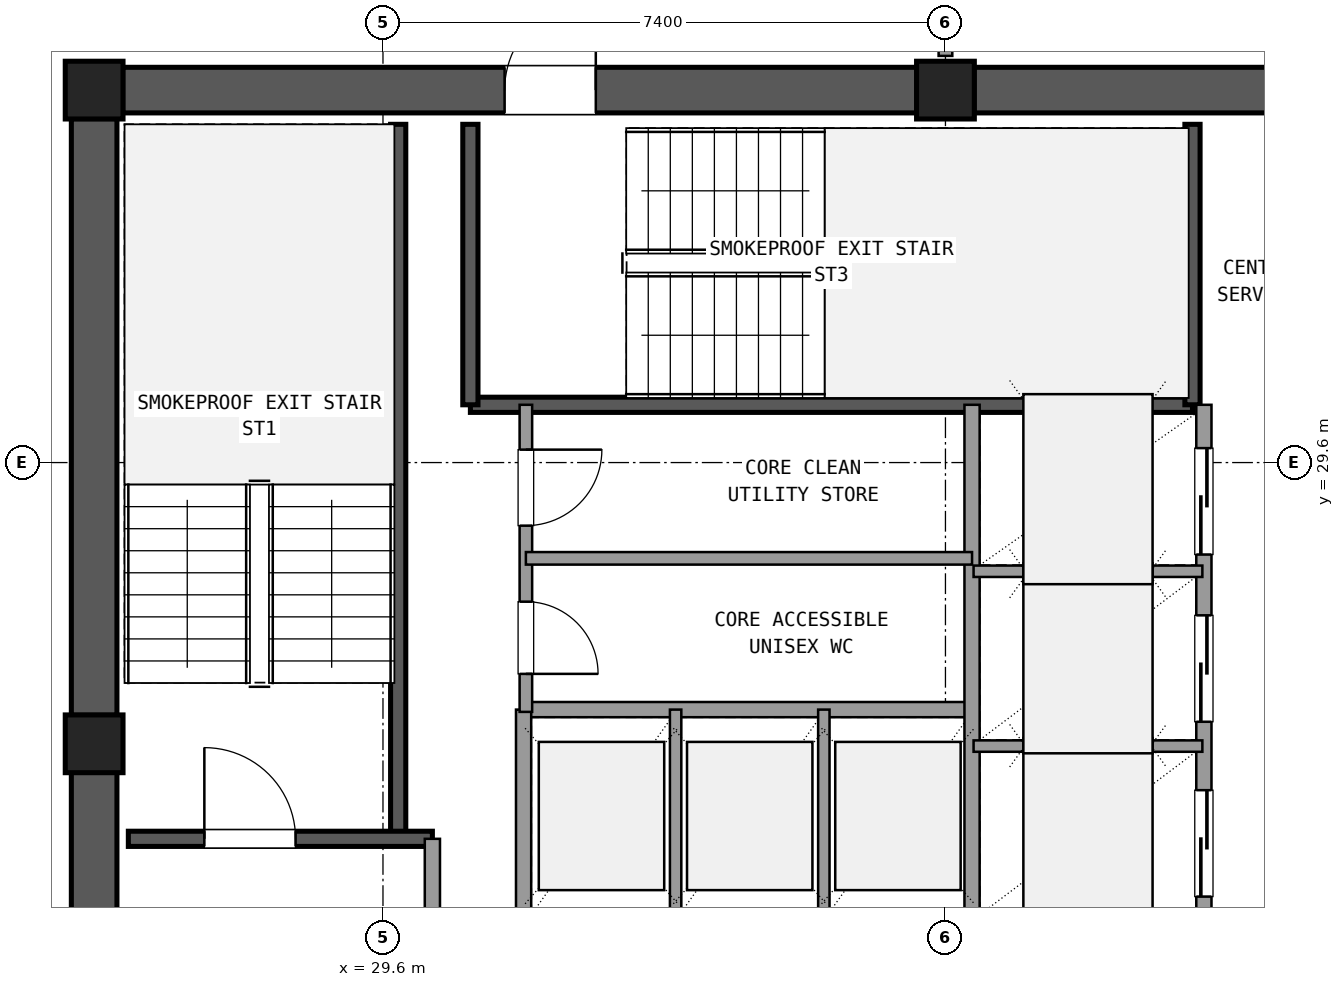
"""IFC4 building model, lengths in metres.
Left out: names, types, materials, properties, quantities, classifications, styles, units other than length and angle.
Written with IfcOpenShell. Run it as: python <this file> out.ifc"""

import sys

from ifc_helpers import new_model, si_unit, direction, frame, frame_2d, origin, origin_2d, place, context, subcontext, project, spatial, rectangle, extrude, element, fill, save


model = new_model("IFC4")
c1 = context("Model", 3, precision=1e-05, world=origin(), true_north=direction((0.0, 1.0)))
c2 = subcontext(c1, "Body", "Model", "MODEL_VIEW")
j1 = project(units=[si_unit("LENGTHUNIT", "METRE"), si_unit("PLANEANGLEUNIT", "RADIAN")], contexts=[c1])
p1 = place(None, origin())
s1 = spatial("IfcSite", under=j1, at=p1, CompositionType="ELEMENT")
p2 = place(p1, origin())
s2 = spatial("IfcBuilding", under=s1, at=p2, CompositionType="ELEMENT")
p3 = place(p2, frame((0.0, 0.0, 264.42)))
s3 = spatial("IfcBuildingStorey", under=s2, at=p3, CompositionType="ELEMENT", Elevation=264.42)
for number, where, z_axis, x_axis in (
    (1, (37.0, 34.5, 0.0), (0.0, 0.0, 1.0), (1.0, 0.0, 0.0)),
    (2, (25.8, 34.5, 0.0), (0.0, 0.0, 1.0), (1.0, 0.0, 0.0)),
    (3, (25.8, 25.9, 0.0), (0.0, 0.0, 1.0), (1.0, 0.0, 0.0)),
):
    element("IfcColumn", number, at=place(p3, frame(where, z_axis=z_axis, x_axis=x_axis)), inside=s3, PredefinedType="COLUMN", context=c2, shape_type="SweptSolid", body=[
        extrude(rectangle(XDim=0.76, YDim=0.76, at=origin_2d()), origin(), (0.0, 0.0, 1.0), 3.6),
    ])
p4 = place(p3, frame((47.825, 34.5, 0.0), z_axis=(0.0, 0.0, 1.0), x_axis=(-1.0, 0.0, 0.0)))
e4 = element("IfcWall", 4, at=p4, inside=s3, PredefinedType="SHEAR", context=c2, shape_type="SweptSolid", body=[
    extrude(rectangle(XDim=10.45, YDim=0.6, at=frame_2d((5.225, 0.0))), origin(), (0.0, 0.0, 1.0), 3.32),
])
p5 = place(p4, frame((4.725, 0.0, 0.0)))
e5 = element("IfcOpeningElement", 5, at=p5, cuts=e4, PredefinedType="OPENING", context=c2, shape_type="SweptSolid", body=[
    extrude(rectangle(XDim=1.6, YDim=2.2, at=frame_2d((0.8, 1.1))), frame((0.0, 0.31, 0.0), z_axis=(0.0, -1.0, 0.0), x_axis=(1.0, 0.0, 0.0)), (0.0, 0.0, 1.0), 0.62),
])
p6 = place(p3, frame((36.625, 34.5, 0.0), z_axis=(0.0, 0.0, 1.0), x_axis=(-1.0, 0.0, 0.0)))
e6 = element("IfcWall", 6, at=p6, inside=s3, PredefinedType="SHEAR", context=c2, shape_type="SweptSolid", body=[
    extrude(rectangle(XDim=10.45, YDim=0.6, at=frame_2d((5.225, 0.0))), origin(), (0.0, 0.0, 1.0), 3.32),
])
p7 = place(p6, frame((4.225, 0.0, 0.0)))
e7 = element("IfcOpeningElement", 7, at=p7, cuts=e6, PredefinedType="OPENING", context=c2, shape_type="SweptSolid", body=[
    extrude(rectangle(XDim=1.2, YDim=2.15, at=frame_2d((0.6, 1.075))), frame((0.0, 0.31, 0.0), z_axis=(0.0, -1.0, 0.0), x_axis=(1.0, 0.0, 0.0)), (0.0, 0.0, 1.0), 0.62),
])
p8 = place(p3, frame((25.8, 34.125, 0.0), z_axis=(0.0, 0.0, 1.0), x_axis=(0.0, -1.0, 0.0)))
e8 = element("IfcWall", 8, at=p8, inside=s3, PredefinedType="SHEAR", context=c2, shape_type="SweptSolid", body=[
    extrude(rectangle(XDim=7.85, YDim=0.6, at=frame_2d((3.925, 0.0))), origin(), (0.0, 0.0, 1.0), 3.32),
])
p9 = place(p3, frame((25.8, 25.525, 0.0), z_axis=(0.0, 0.0, 1.0), x_axis=(0.0, -1.0, 0.0)))
e9 = element("IfcWall", 9, at=p9, inside=s3, PredefinedType="SHEAR", context=c2, shape_type="SweptSolid", body=[
    extrude(rectangle(XDim=7.85, YDim=0.6, at=frame_2d((3.925, 0.0))), origin(), (0.0, 0.0, 1.0), 3.32),
])
p10 = place(p9, frame((2.275, 0.0, 0.0)))
e10 = element("IfcOpeningElement", 10, at=p10, cuts=e9, PredefinedType="OPENING", context=c2, shape_type="SweptSolid", body=[
    extrude(rectangle(XDim=1.2, YDim=2.15, at=frame_2d((0.6, 1.075))), frame((0.0, 0.31, 0.0), z_axis=(0.0, -1.0, 0.0), x_axis=(1.0, 0.0, 0.0)), (0.0, 0.0, 1.0), 0.62),
])
p11 = place(p3, frame((29.8, 24.65, 0.0), z_axis=(0.0, 0.0, 1.0), x_axis=(0.0, 1.0, 0.0)))
e11 = element("IfcWall", 11, at=p11, inside=s3, PredefinedType="SHEAR", context=c2, shape_type="SweptSolid", body=[
    extrude(rectangle(XDim=9.4, YDim=0.2, at=frame_2d((4.7, 0.0))), origin(), (0.0, 0.0, 1.0), 3.32),
])
p12 = place(p3, frame((26.25, 24.65, 0.0), z_axis=(0.0, 0.0, 1.0), x_axis=(1.0, 0.0, 0.0)))
e12 = element("IfcWall", 12, at=p12, inside=s3, PredefinedType="SHEAR", context=c2, shape_type="SweptSolid", body=[
    extrude(rectangle(XDim=4.0, YDim=0.2, at=frame_2d((2.0, 0.0))), origin(), (0.0, 0.0, 1.0), 3.32),
])
p13 = place(p12, frame((1.0, 0.0, 0.0)))
e13 = element("IfcOpeningElement", 13, at=p13, cuts=e12, PredefinedType="OPENING", context=c2, shape_type="SweptSolid", body=[
    extrude(rectangle(XDim=1.2, YDim=2.15, at=frame_2d((0.6, 1.075))), frame((0.0, 0.11, 0.0), z_axis=(0.0, -1.0, 0.0), x_axis=(1.0, 0.0, 0.0)), (0.0, 0.0, 1.0), 0.22),
])
p14 = place(p3, frame((30.75, 30.36, 0.0), z_axis=(0.0, 0.0, 1.0), x_axis=(1.0, 0.0, 0.0)))
e14 = element("IfcWall", 14, at=p14, inside=s3, PredefinedType="SHEAR", context=c2, shape_type="SweptSolid", body=[
    extrude(rectangle(XDim=9.5, YDim=0.2, at=frame_2d((4.75, 0.0))), origin(), (0.0, 0.0, 1.0), 3.32),
])
for number, where, z_axis, x_axis in (
    (15, (30.75, 30.36, 0.0), (0.0, 0.0, 1.0), (0.0, 1.0, 0.0)),
    (16, (40.25, 30.36, 0.0), (0.0, 0.0, 1.0), (0.0, 1.0, 0.0)),
):
    element("IfcWall", number, at=place(p3, frame(where, z_axis=z_axis, x_axis=x_axis)), inside=s3, PredefinedType="SHEAR", context=c2, shape_type="SweptSolid", body=[
        extrude(rectangle(XDim=3.69, YDim=0.2, at=frame_2d((1.845, 0.0))), origin(), (0.0, 0.0, 1.0), 3.32),
    ])
p15 = place(p3, frame((30.25, 17.75, 0.0), z_axis=(0.0, 0.0, 1.0), x_axis=(0.0, 1.0, 0.0)))
e17 = element("IfcWall", 17, at=p15, inside=s3, PredefinedType="SOLIDWALL", context=c2, shape_type="SweptSolid", body=[
    extrude(rectangle(XDim=6.9, YDim=0.2, at=frame_2d((3.45, 0.0))), origin(), (0.0, 0.0, 1.0), 2.61),
])
p16 = place(p15, frame((4.15, 0.0, 0.0)))
e18 = element("IfcOpeningElement", 18, at=p16, cuts=e17, PredefinedType="OPENING", context=c2, shape_type="SweptSolid", body=[
    extrude(rectangle(XDim=1.2, YDim=2.15, at=frame_2d((0.6, 1.075))), frame((0.0, 0.11, 0.0), z_axis=(0.0, -1.0, 0.0), x_axis=(1.0, 0.0, 0.0)), (0.0, 0.0, 1.0), 0.22),
])
p17 = place(p3, frame((31.45, 26.35, 0.0), z_axis=(0.0, 0.0, 1.0), x_axis=(1.0, 0.0, 0.0)))
e19 = element("IfcWall", 19, at=p17, inside=s3, PredefinedType="SOLIDWALL", context=c2, shape_type="SweptSolid", body=[
    extrude(rectangle(XDim=5.9, YDim=0.2, at=frame_2d((2.95, 0.0))), origin(), (0.0, 0.0, 1.0), 2.61),
])
p18 = place(p3, frame((31.45, 23.54, 0.0), z_axis=(0.0, 0.0, 1.0), x_axis=(0.0, 1.0, 0.0)))
e20 = element("IfcWall", 20, at=p18, inside=s3, PredefinedType="SOLIDWALL", context=c2, shape_type="SweptSolid", body=[
    extrude(rectangle(XDim=2.81, YDim=0.2, at=frame_2d((1.405, 0.0))), origin(), (0.0, 0.0, 1.0), 2.61),
])
for number, where, z_axis, x_axis in (
    (21, (33.45, 23.54, 0.0), (0.0, 0.0, 1.0), (0.0, 1.0, 0.0)),
    (22, (35.4, 23.54, 0.0), (0.0, 0.0, 1.0), (0.0, 1.0, 0.0)),
):
    element("IfcWall", number, at=place(p3, frame(where, z_axis=z_axis, x_axis=x_axis)), inside=s3, PredefinedType="PARTITIONING", context=c2, shape_type="SweptSolid", body=[
        extrude(rectangle(XDim=2.81, YDim=0.15, at=frame_2d((1.405, 0.0))), origin(), (0.0, 0.0, 1.0), 2.61),
    ])
p19 = place(p3, frame((37.35, 23.54, 0.0), z_axis=(0.0, 0.0, 1.0), x_axis=(0.0, 1.0, 0.0)))
e23 = element("IfcWall", 23, at=p19, inside=s3, PredefinedType="SOLIDWALL", context=c2, shape_type="SweptSolid", body=[
    extrude(rectangle(XDim=6.82, YDim=0.2, at=frame_2d((3.41, 0.0))), origin(), (0.0, 0.0, 1.0), 2.61),
])
p20 = place(p3, frame((40.4, 23.54, 0.0), z_axis=(0.0, 0.0, 1.0), x_axis=(0.0, 1.0, 0.0)))
e24 = element("IfcWall", 24, at=p20, inside=s3, PredefinedType="SOLIDWALL", context=c2, shape_type="SweptSolid", body=[
    extrude(rectangle(XDim=6.82, YDim=0.2, at=frame_2d((3.41, 0.0))), origin(), (0.0, 0.0, 1.0), 2.61),
])
p21 = place(p20, frame((0.35, 0.0, 0.0)))
e25 = element("IfcOpeningElement", 25, at=p21, cuts=e24, PredefinedType="OPENING", context=c2, shape_type="SweptSolid", body=[
    extrude(rectangle(XDim=1.4, YDim=2.2, at=frame_2d((0.7, 1.1))), frame((0.0, 0.11, 0.0), z_axis=(0.0, -1.0, 0.0), x_axis=(1.0, 0.0, 0.0)), (0.0, 0.0, 1.0), 0.22),
])
p22 = place(p20, frame((2.65, 0.0, 0.0)))
e26 = element("IfcOpeningElement", 26, at=p22, cuts=e24, PredefinedType="OPENING", context=c2, shape_type="SweptSolid", body=[
    extrude(rectangle(XDim=1.4, YDim=2.2, at=frame_2d((0.7, 1.1))), frame((0.0, 0.11, 0.0), z_axis=(0.0, -1.0, 0.0), x_axis=(1.0, 0.0, 0.0)), (0.0, 0.0, 1.0), 0.22),
])
p23 = place(p20, frame((4.85, 0.0, 0.0)))
e27 = element("IfcOpeningElement", 27, at=p23, cuts=e24, PredefinedType="OPENING", context=c2, shape_type="SweptSolid", body=[
    extrude(rectangle(XDim=1.4, YDim=2.2, at=frame_2d((0.7, 1.1))), frame((0.0, 0.11, 0.0), z_axis=(0.0, -1.0, 0.0), x_axis=(1.0, 0.0, 0.0)), (0.0, 0.0, 1.0), 0.22),
])
for number, where, z_axis, x_axis in (
    (28, (37.37, 25.87, 0.0), (0.0, 0.0, 1.0), (1.0, 0.0, 0.0)),
    (29, (37.37, 28.17, 0.0), (0.0, 0.0, 1.0), (1.0, 0.0, 0.0)),
):
    element("IfcWall", number, at=place(p3, frame(where, z_axis=z_axis, x_axis=x_axis)), inside=s3, PredefinedType="PARTITIONING", context=c2, shape_type="SweptSolid", body=[
        extrude(rectangle(XDim=3.01, YDim=0.15, at=frame_2d((1.505, 0.0))), origin(), (0.0, 0.0, 1.0), 2.61),
    ])
p24 = place(p3, frame((31.48, 26.32, 0.0), z_axis=(0.0, 0.0, 1.0), x_axis=(0.0, 1.0, 0.0)))
e30 = element("IfcWall", 30, at=p24, inside=s3, PredefinedType="PLUMBINGWALL", context=c2, shape_type="SweptSolid", body=[
    extrude(rectangle(XDim=4.04, YDim=0.165, at=frame_2d((2.02, 0.0))), origin(), (0.0, 0.0, 1.0), 2.61),
])
p25 = place(p24, frame((0.5, 0.0, 0.0)))
e31 = element("IfcOpeningElement", 31, at=p25, cuts=e30, PredefinedType="OPENING", context=c2, shape_type="SweptSolid", body=[
    extrude(rectangle(XDim=0.95, YDim=2.1, at=frame_2d((0.475, 1.05))), frame((0.0, 0.093, 0.0), z_axis=(0.0, -1.0, 0.0), x_axis=(1.0, 0.0, 0.0)), (0.0, 0.0, 1.0), 0.185),
])
p26 = place(p24, frame((2.45, 0.0, 0.0)))
e32 = element("IfcOpeningElement", 32, at=p26, cuts=e30, PredefinedType="OPENING", context=c2, shape_type="SweptSolid", body=[
    extrude(rectangle(XDim=1.0, YDim=2.15, at=frame_2d((0.5, 1.075))), frame((0.0, 0.093, 0.0), z_axis=(0.0, -1.0, 0.0), x_axis=(1.0, 0.0, 0.0)), (0.0, 0.0, 1.0), 0.185),
])
p27 = place(p3, frame((31.48, 28.34, 0.0), z_axis=(0.0, 0.0, 1.0), x_axis=(1.0, 0.0, 0.0)))
e33 = element("IfcWall", 33, at=p27, inside=s3, PredefinedType="PLUMBINGWALL", context=c2, shape_type="SweptSolid", body=[
    extrude(rectangle(XDim=5.87, YDim=0.165, at=frame_2d((2.935, 0.0))), origin(), (0.0, 0.0, 1.0), 2.61),
])
p28 = place(p3, frame((37.0, 34.95, 0.0), z_axis=(0.0, 0.0, 1.0), x_axis=(0.0, 1.0, 0.0)))
e34 = element("IfcWall", 34, at=p28, inside=s3, PredefinedType="PARTITIONING", context=c2, shape_type="SweptSolid", body=[
    extrude(rectangle(XDim=2.7, YDim=0.18, at=frame_2d((1.35, 0.0))), origin(), (0.0, 0.0, 1.0), 2.61),
])
p29 = place(p28, frame((0.35, 0.0, 0.0)))
e35 = element("IfcOpeningElement", 35, at=p29, cuts=e34, PredefinedType="OPENING", context=c2, shape_type="SweptSolid", body=[
    extrude(rectangle(XDim=2.0, YDim=2.2, at=frame_2d((1.0, 1.1))), frame((0.0, 0.1, 0.0), z_axis=(0.0, -1.0, 0.0), x_axis=(1.0, 0.0, 0.0)), (0.0, 0.0, 1.0), 0.2),
])
p30 = place(p13, origin())
e36 = element("IfcDoor", 36, at=p30, inside=s3, OperationType="SINGLE_SWING_LEFT", PredefinedType="DOOR", context=c2, shape_type="SweptSolid", body=[
    extrude(rectangle(XDim=1.2, YDim=2.15, at=frame_2d((0.6, 1.075))), frame((0.0, 0.025, 0.0), z_axis=(0.0, -1.0, 0.0), x_axis=(1.0, 0.0, 0.0)), (0.0, 0.0, 1.0), 0.05),
])
fill(e13, e36)
p31 = place(p7, frame((1.2, 0.0, 0.0), z_axis=(0.0, 0.0, 1.0), x_axis=(-1.0, 0.0, 0.0)))
e37 = element("IfcDoor", 37, at=p31, inside=s3, OperationType="SINGLE_SWING_LEFT", PredefinedType="DOOR", context=c2, shape_type="SweptSolid", body=[
    extrude(rectangle(XDim=1.2, YDim=2.15, at=frame_2d((0.6, 1.075))), frame((0.0, 0.025, 0.0), z_axis=(0.0, -1.0, 0.0), x_axis=(1.0, 0.0, 0.0)), (0.0, 0.0, 1.0), 0.05),
])
fill(e7, e37)
p32 = place(p21, origin())
e38 = element("IfcDoor", 38, at=p32, inside=s3, OperationType="SLIDING_TO_LEFT", PredefinedType="DOOR", context=c2, shape_type="SweptSolid", body=[
    extrude(rectangle(XDim=1.4, YDim=2.2, at=frame_2d((0.7, 1.1))), frame((0.0, 0.025, 0.0), z_axis=(0.0, -1.0, 0.0), x_axis=(1.0, 0.0, 0.0)), (0.0, 0.0, 1.0), 0.05),
])
fill(e25, e38)
p33 = place(p22, origin())
e39 = element("IfcDoor", 39, at=p33, inside=s3, OperationType="SLIDING_TO_LEFT", PredefinedType="DOOR", context=c2, shape_type="SweptSolid", body=[
    extrude(rectangle(XDim=1.4, YDim=2.2, at=frame_2d((0.7, 1.1))), frame((0.0, 0.025, 0.0), z_axis=(0.0, -1.0, 0.0), x_axis=(1.0, 0.0, 0.0)), (0.0, 0.0, 1.0), 0.05),
])
fill(e26, e39)
p34 = place(p23, origin())
e40 = element("IfcDoor", 40, at=p34, inside=s3, OperationType="SLIDING_TO_RIGHT", PredefinedType="DOOR", context=c2, shape_type="SweptSolid", body=[
    extrude(rectangle(XDim=1.4, YDim=2.2, at=frame_2d((0.7, 1.1))), frame((0.0, 0.025, 0.0), z_axis=(0.0, -1.0, 0.0), x_axis=(1.0, 0.0, 0.0)), (0.0, 0.0, 1.0), 0.05),
])
fill(e27, e40)
p35 = place(p25, frame((0.95, 0.0, 0.0), z_axis=(0.0, 0.0, 1.0), x_axis=(-1.0, 0.0, 0.0)))
e41 = element("IfcDoor", 41, at=p35, inside=s3, OperationType="SINGLE_SWING_LEFT", PredefinedType="DOOR", context=c2, shape_type="SweptSolid", body=[
    extrude(rectangle(XDim=0.95, YDim=2.1, at=frame_2d((0.475, 1.05))), frame((0.0, 0.025, 0.0), z_axis=(0.0, -1.0, 0.0), x_axis=(1.0, 0.0, 0.0)), (0.0, 0.0, 1.0), 0.05),
])
fill(e31, e41)
p36 = place(p26, frame((1.0, 0.0, 0.0), z_axis=(0.0, 0.0, 1.0), x_axis=(-1.0, 0.0, 0.0)))
e42 = element("IfcDoor", 42, at=p36, inside=s3, OperationType="SINGLE_SWING_RIGHT", PredefinedType="DOOR", context=c2, shape_type="SweptSolid", body=[
    extrude(rectangle(XDim=1.0, YDim=2.15, at=frame_2d((0.5, 1.075))), frame((0.0, 0.025, 0.0), z_axis=(0.0, -1.0, 0.0), x_axis=(1.0, 0.0, 0.0)), (0.0, 0.0, 1.0), 0.05),
])
fill(e32, e42)
save(model, sys.argv[1])
